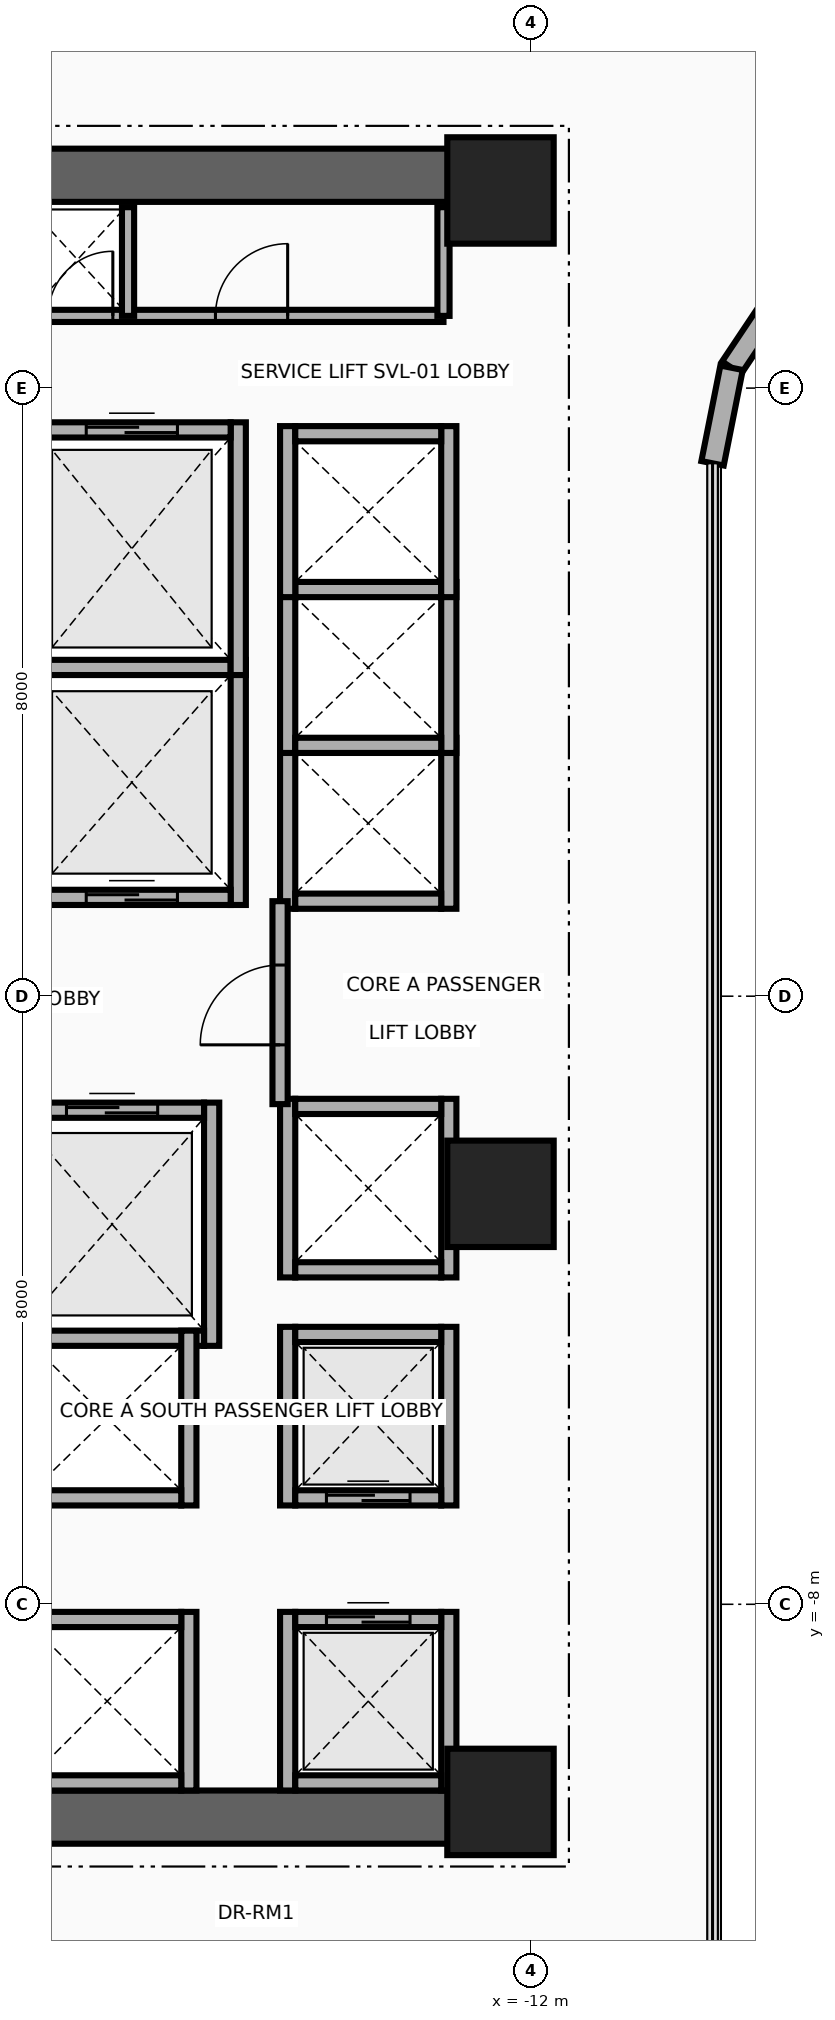
"""IFC4 building model, lengths in metres.
Left out: names, types, materials, properties, quantities, classifications, styles, units other than length and angle.
Written with IfcOpenShell. Run it as: python <this file> out.ifc"""

import sys

from ifc_helpers import new_model, si_unit, direction, frame, frame_2d, origin, origin_2d, place, context, subcontext, project, spatial, rectangle, extrude, source, transform, mapped, element, fill, save


model = new_model("IFC4")
c1 = context("Model", 3, precision=1e-05, world=origin(), true_north=direction((0.0, 1.0)))
c2 = subcontext(c1, "Body", "Model", "MODEL_VIEW")
j1 = project(units=[si_unit("LENGTHUNIT", "METRE"), si_unit("PLANEANGLEUNIT", "RADIAN")], contexts=[c1])
p1 = place(None, origin())
s1 = spatial("IfcSite", under=j1, at=p1, CompositionType="ELEMENT")
p2 = place(p1, origin())
s2 = spatial("IfcBuilding", under=s1, at=p2, CompositionType="ELEMENT")
p3 = place(p2, frame((0.0, 0.0, 81.5)))
s3 = spatial("IfcBuildingStorey", under=s2, at=p3, CompositionType="ELEMENT", Elevation=81.5)
for number, where, z_axis, x_axis in (
    (1, (-22.65, 10.8, 0.0), (0.0, 0.0, 1.0), (1.0, 0.0, 0.0)),
    (2, (-22.65, -10.8, 0.0), (0.0, 0.0, 1.0), (1.0, 0.0, 0.0)),
):
    element("IfcWall", number, at=place(p3, frame(where, z_axis=z_axis, x_axis=x_axis)), inside=s3, PredefinedType="SHEAR", context=c2, shape_type="SweptSolid", body=[
        extrude(rectangle(XDim=10.25, YDim=0.7, at=frame_2d((5.125, 0.0))), origin(), (0.0, 0.0, 1.0), 3.46),
    ])
m1 = source(origin(), c2, "Body", "SweptSolid", [
    extrude(rectangle(XDim=1.4, YDim=1.4, at=origin_2d()), origin(), (0.0, 0.0, 1.0), 3.7),
])
for number, where, z_axis, x_axis in (
    (3, (-12.4, -10.6, 0.0), (0.0, 0.0, 1.0), (1.0, 0.0, 0.0)),
    (4, (-12.4, -2.6, 0.0), (0.0, 0.0, 1.0), (1.0, 0.0, 0.0)),
    (5, (-12.4, 10.6, 0.0), (0.0, 0.0, 1.0), (1.0, 0.0, 0.0)),
):
    element("IfcColumn", number, at=place(p3, frame(where, z_axis=z_axis, x_axis=x_axis)), inside=s3, PredefinedType="COLUMN", context=c2, shape_type="MappedRepresentation", body=[
        mapped(m1, transform((0.0, 0.0, 0.0), x_axis=(1.0, 0.0, 0.0), y_axis=(0.0, 1.0, 0.0), z_axis=(0.0, 0.0, 1.0), scale=1.0)),
    ])
p4 = place(p3, frame((-8.642, 9.342, 0.0), z_axis=(0.0, 0.0, 1.0), x_axis=(-0.555615398575, -0.831439431869, 0.0)))
e6 = element("IfcWall", 6, at=p4, inside=s3, PredefinedType="SOLIDWALL", context=c2, shape_type="SweptSolid", body=[
    extrude(rectangle(XDim=1.292, YDim=0.3, at=frame_2d((0.646, 0.0))), origin(), (0.0, 0.0, 1.0), 3.46),
])
p5 = place(p3, frame((-9.36, 8.268, 0.0), z_axis=(0.0, 0.0, 1.0), x_axis=(-0.195090163074, -0.980785312019, 0.0)))
e7 = element("IfcWall", 7, at=p5, inside=s3, PredefinedType="SOLIDWALL", context=c2, shape_type="SweptSolid", body=[
    extrude(rectangle(XDim=1.281, YDim=0.3, at=frame_2d((0.641, 0.0))), origin(), (0.0, 0.0, 1.0), 3.46),
])
p6 = place(p3, frame((-15.85, 1.2, 0.0), z_axis=(0.0, 0.0, 1.0), x_axis=(0.0, 1.0, 0.0)))
e8 = element("IfcWall", 8, at=p6, inside=s3, PredefinedType="MOVABLE", context=c2, shape_type="SweptSolid", body=[
    extrude(rectangle(XDim=3.225, YDim=0.2, at=frame_2d((1.613, 0.0))), origin(), (0.0, 0.0, 1.0), 3.46),
])
p7 = place(p3, frame((-18.55, 1.3, 0.0), z_axis=(0.0, 0.0, 1.0), x_axis=(1.0, 0.0, 0.0)))
e9 = element("IfcWall", 9, at=p7, inside=s3, PredefinedType="MOVABLE", context=c2, shape_type="SweptSolid", body=[
    extrude(rectangle(XDim=2.6, YDim=0.2, at=frame_2d((1.3, 0.0))), origin(), (0.0, 0.0, 1.0), 3.46),
])
p8 = place(p7, frame((0.7, 0.0, 0.0)))
e10 = element("IfcOpeningElement", 10, at=p8, cuts=e9, PredefinedType="OPENING", context=c2, shape_type="SweptSolid", body=[
    extrude(rectangle(XDim=1.2, YDim=2.1, at=frame_2d((0.6, 1.05))), frame((0.0, 0.115, 0.0), z_axis=(0.0, -1.0, 0.0), x_axis=(1.0, 0.0, 0.0)), (0.0, 0.0, 1.0), 0.23),
])
p9 = place(p3, frame((-18.55, 4.325, 0.0), z_axis=(0.0, 0.0, 1.0), x_axis=(1.0, 0.0, 0.0)))
e11 = element("IfcWall", 11, at=p9, inside=s3, PredefinedType="MOVABLE", context=c2, shape_type="SweptSolid", body=[
    extrude(rectangle(XDim=2.6, YDim=0.2, at=frame_2d((1.3, 0.0))), origin(), (0.0, 0.0, 1.0), 3.46),
])
p10 = place(p3, frame((-16.2, -4.6, 0.0), z_axis=(0.0, 0.0, 1.0), x_axis=(0.0, 1.0, 0.0)))
e12 = element("IfcWall", 12, at=p10, inside=s3, PredefinedType="MOVABLE", context=c2, shape_type="SweptSolid", body=[
    extrude(rectangle(XDim=3.2, YDim=0.2, at=frame_2d((1.6, 0.0))), origin(), (0.0, 0.0, 1.0), 3.46),
])
p11 = place(p3, frame((-18.72, -4.5, 0.0), z_axis=(0.0, 0.0, 1.0), x_axis=(1.0, 0.0, 0.0)))
e13 = element("IfcWall", 13, at=p11, inside=s3, PredefinedType="MOVABLE", context=c2, shape_type="SweptSolid", body=[
    extrude(rectangle(XDim=2.42, YDim=0.2, at=frame_2d((1.21, 0.0))), origin(), (0.0, 0.0, 1.0), 3.46),
])
p12 = place(p3, frame((-18.72, -1.5, 0.0), z_axis=(0.0, 0.0, 1.0), x_axis=(1.0, 0.0, 0.0)))
e14 = element("IfcWall", 14, at=p12, inside=s3, PredefinedType="MOVABLE", context=c2, shape_type="SweptSolid", body=[
    extrude(rectangle(XDim=2.42, YDim=0.2, at=frame_2d((1.21, 0.0))), origin(), (0.0, 0.0, 1.0), 3.46),
])
p13 = place(p12, frame((0.61, 0.0, 0.0)))
e15 = element("IfcOpeningElement", 15, at=p13, cuts=e14, PredefinedType="OPENING", context=c2, shape_type="SweptSolid", body=[
    extrude(rectangle(XDim=1.2, YDim=2.1, at=frame_2d((0.6, 1.05))), frame((0.0, 0.115, 0.0), z_axis=(0.0, -1.0, 0.0), x_axis=(1.0, 0.0, 0.0)), (0.0, 0.0, 1.0), 0.23),
])
p14 = place(p3, frame((-15.85, 4.225, 0.0), z_axis=(0.0, 0.0, 1.0), x_axis=(0.0, 1.0, 0.0)))
e16 = element("IfcWall", 16, at=p14, inside=s3, PredefinedType="MOVABLE", context=c2, shape_type="SweptSolid", body=[
    extrude(rectangle(XDim=3.325, YDim=0.2, at=frame_2d((1.663, 0.0))), origin(), (0.0, 0.0, 1.0), 3.46),
])
p15 = place(p3, frame((-18.55, 7.45, 0.0), z_axis=(0.0, 0.0, 1.0), x_axis=(1.0, 0.0, 0.0)))
e17 = element("IfcWall", 17, at=p15, inside=s3, PredefinedType="MOVABLE", context=c2, shape_type="SweptSolid", body=[
    extrude(rectangle(XDim=2.6, YDim=0.2, at=frame_2d((1.3, 0.0))), origin(), (0.0, 0.0, 1.0), 3.46),
])
p16 = place(p15, frame((0.7, 0.0, 0.0)))
e18 = element("IfcOpeningElement", 18, at=p16, cuts=e17, PredefinedType="OPENING", context=c2, shape_type="SweptSolid", body=[
    extrude(rectangle(XDim=1.2, YDim=2.1, at=frame_2d((0.6, 1.05))), frame((0.0, 0.115, 0.0), z_axis=(0.0, -1.0, 0.0), x_axis=(1.0, 0.0, 0.0)), (0.0, 0.0, 1.0), 0.23),
])
for number, where, z_axis, x_axis in (
    (19, (-15.2, -10.45, 0.0), (0.0, 0.0, 1.0), (0.0, 1.0, 0.0)),
    (20, (-13.08, -10.45, 0.0), (0.0, 0.0, 1.0), (0.0, 1.0, 0.0)),
):
    element("IfcWall", number, at=place(p3, frame(where, z_axis=z_axis, x_axis=x_axis)), inside=s3, PredefinedType="MOVABLE", context=c2, shape_type="SweptSolid", body=[
        extrude(rectangle(XDim=2.35, YDim=0.2, at=frame_2d((1.175, 0.0))), origin(), (0.0, 0.0, 1.0), 2.583),
    ])
p17 = place(p3, frame((-15.1, -10.35, 0.0), z_axis=(0.0, 0.0, 1.0), x_axis=(1.0, 0.0, 0.0)))
e21 = element("IfcWall", 21, at=p17, inside=s3, PredefinedType="MOVABLE", context=c2, shape_type="SweptSolid", body=[
    extrude(rectangle(XDim=1.92, YDim=0.2, at=frame_2d((0.96, 0.0))), origin(), (0.0, 0.0, 1.0), 2.583),
])
p18 = place(p3, frame((-15.1, -8.2, 0.0), z_axis=(0.0, 0.0, 1.0), x_axis=(1.0, 0.0, 0.0)))
e22 = element("IfcWall", 22, at=p18, inside=s3, PredefinedType="MOVABLE", context=c2, shape_type="SweptSolid", body=[
    extrude(rectangle(XDim=1.92, YDim=0.2, at=frame_2d((0.96, 0.0))), origin(), (0.0, 0.0, 1.0), 3.46),
])
p19 = place(p18, frame((0.41, 0.0, 0.0)))
e23 = element("IfcOpeningElement", 23, at=p19, cuts=e22, PredefinedType="OPENING", context=c2, shape_type="SweptSolid", body=[
    extrude(rectangle(XDim=1.1, YDim=2.1, at=frame_2d((0.55, 1.05))), frame((0.0, 0.115, 0.0), z_axis=(0.0, -1.0, 0.0), x_axis=(1.0, 0.0, 0.0)), (0.0, 0.0, 1.0), 0.23),
])
for number, where, z_axis, x_axis in (
    (24, (-15.2, -6.7, 0.0), (0.0, 0.0, 1.0), (0.0, 1.0, 0.0)),
    (25, (-13.08, -6.7, 0.0), (0.0, 0.0, 1.0), (0.0, 1.0, 0.0)),
):
    element("IfcWall", number, at=place(p3, frame(where, z_axis=z_axis, x_axis=x_axis)), inside=s3, PredefinedType="MOVABLE", context=c2, shape_type="SweptSolid", body=[
        extrude(rectangle(XDim=2.35, YDim=0.2, at=frame_2d((1.175, 0.0))), origin(), (0.0, 0.0, 1.0), 3.46),
    ])
p20 = place(p3, frame((-15.1, -6.6, 0.0), z_axis=(0.0, 0.0, 1.0), x_axis=(1.0, 0.0, 0.0)))
e26 = element("IfcWall", 26, at=p20, inside=s3, PredefinedType="MOVABLE", context=c2, shape_type="SweptSolid", body=[
    extrude(rectangle(XDim=1.92, YDim=0.2, at=frame_2d((0.96, 0.0))), origin(), (0.0, 0.0, 1.0), 3.46),
])
p21 = place(p20, frame((0.41, 0.0, 0.0)))
e27 = element("IfcOpeningElement", 27, at=p21, cuts=e26, PredefinedType="OPENING", context=c2, shape_type="SweptSolid", body=[
    extrude(rectangle(XDim=1.1, YDim=2.1, at=frame_2d((0.55, 1.05))), frame((0.0, 0.115, 0.0), z_axis=(0.0, -1.0, 0.0), x_axis=(1.0, 0.0, 0.0)), (0.0, 0.0, 1.0), 0.23),
])
p22 = place(p3, frame((-15.1, -4.45, 0.0), z_axis=(0.0, 0.0, 1.0), x_axis=(1.0, 0.0, 0.0)))
e28 = element("IfcWall", 28, at=p22, inside=s3, PredefinedType="MOVABLE", context=c2, shape_type="SweptSolid", body=[
    extrude(rectangle(XDim=1.92, YDim=0.2, at=frame_2d((0.96, 0.0))), origin(), (0.0, 0.0, 1.0), 3.46),
])
p23 = place(p3, frame((-16.5, -10.45, 0.0), z_axis=(0.0, 0.0, 1.0), x_axis=(0.0, 1.0, 0.0)))
e29 = element("IfcWall", 29, at=p23, inside=s3, PredefinedType="MOVABLE", context=c2, shape_type="SweptSolid", body=[
    extrude(rectangle(XDim=2.35, YDim=0.2, at=frame_2d((1.175, 0.0))), origin(), (0.0, 0.0, 1.0), 2.583),
])
p24 = place(p3, frame((-18.55, -10.35, 0.0), z_axis=(0.0, 0.0, 1.0), x_axis=(1.0, 0.0, 0.0)))
e30 = element("IfcWall", 30, at=p24, inside=s3, PredefinedType="MOVABLE", context=c2, shape_type="SweptSolid", body=[
    extrude(rectangle(XDim=1.95, YDim=0.2, at=frame_2d((0.975, 0.0))), origin(), (0.0, 0.0, 1.0), 2.583),
])
p25 = place(p3, frame((-18.55, -8.2, 0.0), z_axis=(0.0, 0.0, 1.0), x_axis=(1.0, 0.0, 0.0)))
e31 = element("IfcWall", 31, at=p25, inside=s3, PredefinedType="MOVABLE", context=c2, shape_type="SweptSolid", body=[
    extrude(rectangle(XDim=1.95, YDim=0.2, at=frame_2d((0.975, 0.0))), origin(), (0.0, 0.0, 1.0), 3.46),
])
for number, where, z_axis, x_axis in (
    (32, (-15.2, 1.15, 0.0), (0.0, 0.0, 1.0), (0.0, 1.0, 0.0)),
    (33, (-13.08, 1.15, 0.0), (0.0, 0.0, 1.0), (0.0, 1.0, 0.0)),
):
    element("IfcWall", number, at=place(p3, frame(where, z_axis=z_axis, x_axis=x_axis)), inside=s3, PredefinedType="MOVABLE", context=c2, shape_type="SweptSolid", body=[
        extrude(rectangle(XDim=2.25, YDim=0.2, at=frame_2d((1.125, 0.0))), origin(), (0.0, 0.0, 1.0), 3.46),
    ])
p26 = place(p3, frame((-15.1, 1.25, 0.0), z_axis=(0.0, 0.0, 1.0), x_axis=(1.0, 0.0, 0.0)))
e34 = element("IfcWall", 34, at=p26, inside=s3, PredefinedType="MOVABLE", context=c2, shape_type="SweptSolid", body=[
    extrude(rectangle(XDim=1.92, YDim=0.2, at=frame_2d((0.96, 0.0))), origin(), (0.0, 0.0, 1.0), 3.46),
])
for number, where, z_axis, x_axis in (
    (35, (-15.2, 3.2, 0.0), (0.0, 0.0, 1.0), (0.0, 1.0, 0.0)),
    (36, (-13.08, 3.2, 0.0), (0.0, 0.0, 1.0), (0.0, 1.0, 0.0)),
):
    element("IfcWall", number, at=place(p3, frame(where, z_axis=z_axis, x_axis=x_axis)), inside=s3, PredefinedType="MOVABLE", context=c2, shape_type="SweptSolid", body=[
        extrude(rectangle(XDim=2.25, YDim=0.2, at=frame_2d((1.125, 0.0))), origin(), (0.0, 0.0, 1.0), 3.46),
    ])
for number, where, z_axis, x_axis in (
    (37, (-15.1, 3.3, 0.0), (0.0, 0.0, 1.0), (1.0, 0.0, 0.0)),
    (38, (-15.1, 5.35, 0.0), (0.0, 0.0, 1.0), (1.0, 0.0, 0.0)),
):
    element("IfcWall", number, at=place(p3, frame(where, z_axis=z_axis, x_axis=x_axis)), inside=s3, PredefinedType="MOVABLE", context=c2, shape_type="SweptSolid", body=[
        extrude(rectangle(XDim=1.92, YDim=0.2, at=frame_2d((0.96, 0.0))), origin(), (0.0, 0.0, 1.0), 3.46),
    ])
for number, where, z_axis, x_axis in (
    (39, (-15.2, 5.25, 0.0), (0.0, 0.0, 1.0), (0.0, 1.0, 0.0)),
    (40, (-13.08, 5.25, 0.0), (0.0, 0.0, 1.0), (0.0, 1.0, 0.0)),
):
    element("IfcWall", number, at=place(p3, frame(where, z_axis=z_axis, x_axis=x_axis)), inside=s3, PredefinedType="MOVABLE", context=c2, shape_type="SweptSolid", body=[
        extrude(rectangle(XDim=2.25, YDim=0.2, at=frame_2d((1.125, 0.0))), origin(), (0.0, 0.0, 1.0), 3.46),
    ])
p27 = place(p3, frame((-15.1, 7.4, 0.0), z_axis=(0.0, 0.0, 1.0), x_axis=(1.0, 0.0, 0.0)))
e41 = element("IfcWall", 41, at=p27, inside=s3, PredefinedType="MOVABLE", context=c2, shape_type="SweptSolid", body=[
    extrude(rectangle(XDim=1.92, YDim=0.2, at=frame_2d((0.96, 0.0))), origin(), (0.0, 0.0, 1.0), 3.46),
])
p28 = place(p3, frame((-16.5, -6.7, 0.0), z_axis=(0.0, 0.0, 1.0), x_axis=(0.0, 1.0, 0.0)))
e42 = element("IfcWall", 42, at=p28, inside=s3, PredefinedType="MOVABLE", context=c2, shape_type="SweptSolid", body=[
    extrude(rectangle(XDim=2.3, YDim=0.2, at=frame_2d((1.15, 0.0))), origin(), (0.0, 0.0, 1.0), 3.46),
])
p29 = place(p3, frame((-18.55, -6.6, 0.0), z_axis=(0.0, 0.0, 1.0), x_axis=(1.0, 0.0, 0.0)))
e43 = element("IfcWall", 43, at=p29, inside=s3, PredefinedType="MOVABLE", context=c2, shape_type="SweptSolid", body=[
    extrude(rectangle(XDim=1.95, YDim=0.2, at=frame_2d((0.975, 0.0))), origin(), (0.0, 0.0, 1.0), 3.46),
])
for number, where, z_axis, x_axis in (
    (44, (-15.2, -3.7, 0.0), (0.0, 0.0, 1.0), (0.0, 1.0, 0.0)),
    (45, (-13.08, -3.7, 0.0), (0.0, 0.0, 1.0), (0.0, 1.0, 0.0)),
):
    element("IfcWall", number, at=place(p3, frame(where, z_axis=z_axis, x_axis=x_axis)), inside=s3, PredefinedType="MOVABLE", context=c2, shape_type="SweptSolid", body=[
        extrude(rectangle(XDim=2.35, YDim=0.2, at=frame_2d((1.175, 0.0))), origin(), (0.0, 0.0, 1.0), 3.46),
    ])
for number, where, z_axis, x_axis in (
    (46, (-15.1, -3.6, 0.0), (0.0, 0.0, 1.0), (1.0, 0.0, 0.0)),
    (47, (-15.1, -1.45, 0.0), (0.0, 0.0, 1.0), (1.0, 0.0, 0.0)),
):
    element("IfcWall", number, at=place(p3, frame(where, z_axis=z_axis, x_axis=x_axis)), inside=s3, PredefinedType="MOVABLE", context=c2, shape_type="SweptSolid", body=[
        extrude(rectangle(XDim=1.92, YDim=0.2, at=frame_2d((0.96, 0.0))), origin(), (0.0, 0.0, 1.0), 3.46),
    ])
p30 = place(p3, frame((-15.3, -1.42, 0.0), z_axis=(0.0, 0.0, 1.0), x_axis=(0.0, 1.0, 0.0)))
e48 = element("IfcWall", 48, at=p30, inside=s3, PredefinedType="PARTITIONING", context=c2, shape_type="SweptSolid", body=[
    extrude(rectangle(XDim=2.67, YDim=0.2, at=frame_2d((1.335, 0.0))), origin(), (0.0, 0.0, 1.0), 3.46),
])
p31 = place(p30, frame((0.78, 0.0, 0.0)))
e49 = element("IfcOpeningElement", 49, at=p31, cuts=e48, PredefinedType="OPENING", context=c2, shape_type="SweptSolid", body=[
    extrude(rectangle(XDim=1.05, YDim=2.15, at=frame_2d((0.525, 1.075))), frame((0.0, 0.115, 0.0), z_axis=(0.0, -1.0, 0.0), x_axis=(1.0, 0.0, 0.0)), (0.0, 0.0, 1.0), 0.23),
])
p32 = place(p3, frame((-18.65, 8.95, 0.0), z_axis=(0.0, 0.0, 1.0), x_axis=(1.0, 0.0, 0.0)))
e50 = element("IfcWall", 50, at=p32, inside=s3, PredefinedType="PARTITIONING", context=c2, shape_type="SweptSolid", body=[
    extrude(rectangle(XDim=5.5, YDim=0.16, at=frame_2d((2.75, 0.0))), origin(), (0.0, 0.0, 1.0), 3.46),
])
p33 = place(p32, frame((0.3, 0.0, 0.0)))
e51 = element("IfcOpeningElement", 51, at=p33, cuts=e50, PredefinedType="OPENING", context=c2, shape_type="SweptSolid", body=[
    extrude(rectangle(XDim=0.85, YDim=2.05, at=frame_2d((0.425, 1.025))), frame((0.0, 0.095, 0.0), z_axis=(0.0, -1.0, 0.0), x_axis=(1.0, 0.0, 0.0)), (0.0, 0.0, 1.0), 0.19),
])
p34 = place(p32, frame((2.5, 0.0, 0.0)))
e52 = element("IfcOpeningElement", 52, at=p34, cuts=e50, PredefinedType="OPENING", context=c2, shape_type="SweptSolid", body=[
    extrude(rectangle(XDim=0.95, YDim=2.15, at=frame_2d((0.475, 1.075))), frame((0.0, 0.095, 0.0), z_axis=(0.0, -1.0, 0.0), x_axis=(1.0, 0.0, 0.0)), (0.0, 0.0, 1.0), 0.19),
])
for number, where, z_axis, x_axis in (
    (53, (-13.15, 8.95, 0.0), (0.0, 0.0, 1.0), (0.0, 1.0, 0.0)),
    (54, (-17.3, 8.95, 0.0), (0.0, 0.0, 1.0), (0.0, 1.0, 0.0)),
):
    element("IfcWall", number, at=place(p3, frame(where, z_axis=z_axis, x_axis=x_axis)), inside=s3, PredefinedType="PARTITIONING", context=c2, shape_type="SweptSolid", body=[
        extrude(rectangle(XDim=1.43, YDim=0.16, at=frame_2d((0.715, 0.0))), origin(), (0.0, 0.0, 1.0), 3.46),
    ])
p35 = place(p8, origin())
e55 = element("IfcDoor", 55, at=p35, inside=s3, OperationType="DOUBLE_DOOR_SLIDING", PredefinedType="DOOR", context=c2, shape_type="SweptSolid", body=[
    extrude(rectangle(XDim=1.2, YDim=2.1, at=frame_2d((0.6, 1.05))), frame((0.0, 0.025, 0.0), z_axis=(0.0, -1.0, 0.0), x_axis=(1.0, 0.0, 0.0)), (0.0, 0.0, 1.0), 0.05),
])
fill(e10, e55)
p36 = place(p13, origin())
e56 = element("IfcDoor", 56, at=p36, inside=s3, OperationType="DOUBLE_DOOR_SLIDING", PredefinedType="DOOR", context=c2, shape_type="SweptSolid", body=[
    extrude(rectangle(XDim=1.2, YDim=2.1, at=frame_2d((0.6, 1.05))), frame((0.0, 0.025, 0.0), z_axis=(0.0, -1.0, 0.0), x_axis=(1.0, 0.0, 0.0)), (0.0, 0.0, 1.0), 0.05),
])
fill(e15, e56)
p37 = place(p16, origin())
e57 = element("IfcDoor", 57, at=p37, inside=s3, OperationType="DOUBLE_DOOR_SLIDING", PredefinedType="DOOR", context=c2, shape_type="SweptSolid", body=[
    extrude(rectangle(XDim=1.2, YDim=2.1, at=frame_2d((0.6, 1.05))), frame((0.0, 0.025, 0.0), z_axis=(0.0, -1.0, 0.0), x_axis=(1.0, 0.0, 0.0)), (0.0, 0.0, 1.0), 0.05),
])
fill(e18, e57)
p38 = place(p19, origin())
e58 = element("IfcDoor", 58, at=p38, inside=s3, OperationType="DOUBLE_DOOR_SLIDING", PredefinedType="DOOR", context=c2, shape_type="SweptSolid", body=[
    extrude(rectangle(XDim=1.1, YDim=2.1, at=frame_2d((0.55, 1.05))), frame((0.0, 0.025, 0.0), z_axis=(0.0, -1.0, 0.0), x_axis=(1.0, 0.0, 0.0)), (0.0, 0.0, 1.0), 0.05),
])
fill(e23, e58)
p39 = place(p21, origin())
e59 = element("IfcDoor", 59, at=p39, inside=s3, OperationType="DOUBLE_DOOR_SLIDING", PredefinedType="DOOR", context=c2, shape_type="SweptSolid", body=[
    extrude(rectangle(XDim=1.1, YDim=2.1, at=frame_2d((0.55, 1.05))), frame((0.0, 0.025, 0.0), z_axis=(0.0, -1.0, 0.0), x_axis=(1.0, 0.0, 0.0)), (0.0, 0.0, 1.0), 0.05),
])
fill(e27, e59)
p40 = place(p31, origin())
e60 = element("IfcDoor", 60, at=p40, inside=s3, OperationType="SINGLE_SWING_RIGHT", PredefinedType="DOOR", context=c2, shape_type="SweptSolid", body=[
    extrude(rectangle(XDim=1.05, YDim=2.15, at=frame_2d((0.525, 1.075))), frame((0.0, 0.025, 0.0), z_axis=(0.0, -1.0, 0.0), x_axis=(1.0, 0.0, 0.0)), (0.0, 0.0, 1.0), 0.05),
])
fill(e49, e60)
p41 = place(p33, origin())
e61 = element("IfcDoor", 61, at=p41, inside=s3, OperationType="SINGLE_SWING_LEFT", PredefinedType="DOOR", context=c2, shape_type="SweptSolid", body=[
    extrude(rectangle(XDim=0.85, YDim=2.05, at=frame_2d((0.425, 1.025))), frame((0.0, 0.025, 0.0), z_axis=(0.0, -1.0, 0.0), x_axis=(1.0, 0.0, 0.0)), (0.0, 0.0, 1.0), 0.05),
])
fill(e51, e61)
p42 = place(p34, origin())
e62 = element("IfcDoor", 62, at=p42, inside=s3, OperationType="SINGLE_SWING_RIGHT", PredefinedType="DOOR", context=c2, shape_type="SweptSolid", body=[
    extrude(rectangle(XDim=0.95, YDim=2.15, at=frame_2d((0.475, 1.075))), frame((0.0, 0.025, 0.0), z_axis=(0.0, -1.0, 0.0), x_axis=(1.0, 0.0, 0.0)), (0.0, 0.0, 1.0), 0.05),
])
fill(e52, e62)
save(model, sys.argv[1])
